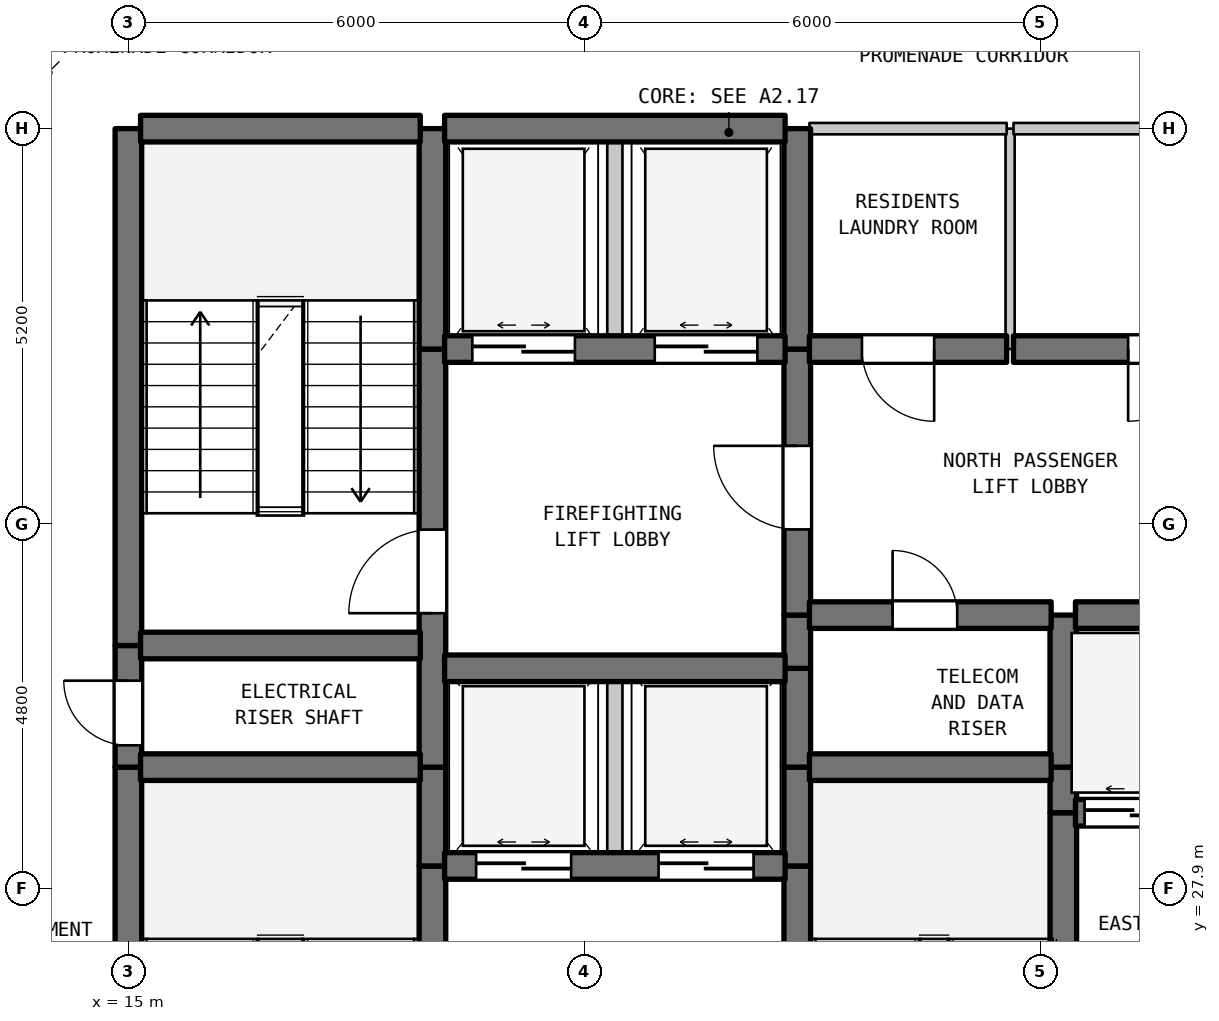
"""IFC4 building model, lengths in metres.
Left out: names, types, materials, properties, quantities, classifications, styles, units other than length and angle.
Written with IfcOpenShell. Run it as: python <this file> out.ifc"""

import sys

from ifc_helpers import new_model, si_unit, direction, frame, frame_2d, origin, place, context, subcontext, project, spatial, rectangle, extrude, element, fill, save


model = new_model("IFC4")
c1 = context("Model", 3, precision=1e-05, world=origin(), true_north=direction((0.0, 1.0)))
c2 = subcontext(c1, "Body", "Model", "MODEL_VIEW")
j1 = project(units=[si_unit("LENGTHUNIT", "METRE"), si_unit("PLANEANGLEUNIT", "RADIAN")], contexts=[c1])
p1 = place(None, origin())
s1 = spatial("IfcSite", under=j1, at=p1, CompositionType="ELEMENT")
p2 = place(p1, origin())
s2 = spatial("IfcBuilding", under=s1, at=p2, CompositionType="ELEMENT")
p3 = place(p2, frame((0.0, 0.0, 192.1)))
s3 = spatial("IfcBuildingStorey", under=s2, at=p3, CompositionType="ELEMENT", Elevation=192.1)
p4 = place(p3, frame((15.0, 22.7, 0.0), z_axis=(0.0, 0.0, 1.0), x_axis=(0.0, 1.0, 0.0)))
e1 = element("IfcWall", 1, at=p4, inside=s3, PredefinedType="SHEAR", context=c2, shape_type="SweptSolid", body=[
    extrude(rectangle(XDim=6.8, YDim=0.35, at=frame_2d((3.4, 0.0))), origin(), (0.0, 0.0, 1.0), 3.39),
])
p5 = place(p3, frame((15.0, 29.5, 0.0), z_axis=(0.0, 0.0, 1.0), x_axis=(0.0, 1.0, 0.0)))
e2 = element("IfcWall", 2, at=p5, inside=s3, PredefinedType="SHEAR", context=c2, shape_type="SweptSolid", body=[
    extrude(rectangle(XDim=1.6, YDim=0.35, at=frame_2d((0.8, 0.0))), origin(), (0.0, 0.0, 1.0), 3.39),
])
p6 = place(p5, frame((0.287, 0.0, 0.0)))
e3 = element("IfcOpeningElement", 3, at=p6, cuts=e2, PredefinedType="OPENING", context=c2, shape_type="SweptSolid", body=[
    extrude(rectangle(XDim=0.85, YDim=2.1, at=frame_2d((0.425, 1.05))), frame((0.0, 0.185, 0.0), z_axis=(0.0, -1.0, 0.0), x_axis=(1.0, 0.0, 0.0)), (0.0, 0.0, 1.0), 0.37),
])
p7 = place(p3, frame((15.0, 31.1, 0.0), z_axis=(0.0, 0.0, 1.0), x_axis=(0.0, 1.0, 0.0)))
e4 = element("IfcWall", 4, at=p7, inside=s3, PredefinedType="SHEAR", context=c2, shape_type="SweptSolid", body=[
    extrude(rectangle(XDim=6.8, YDim=0.35, at=frame_2d((3.4, 0.0))), origin(), (0.0, 0.0, 1.0), 3.39),
])
p8 = place(p3, frame((19.0, 22.7, 0.0), z_axis=(0.0, 0.0, 1.0), x_axis=(0.0, 1.0, 0.0)))
e5 = element("IfcWall", 5, at=p8, inside=s3, PredefinedType="SHEAR", context=c2, shape_type="SweptSolid", body=[
    extrude(rectangle(XDim=5.5, YDim=0.35, at=frame_2d((2.75, 0.0))), origin(), (0.0, 0.0, 1.0), 3.39),
])
p9 = place(p8, frame((0.631, 0.0, 0.0)))
e6 = element("IfcOpeningElement", 6, at=p9, cuts=e5, PredefinedType="OPENING", context=c2, shape_type="SweptSolid", body=[
    extrude(rectangle(XDim=1.1, YDim=2.15, at=frame_2d((0.55, 1.075))), frame((0.0, 0.185, 0.0), z_axis=(0.0, -1.0, 0.0), x_axis=(1.0, 0.0, 0.0)), (0.0, 0.0, 1.0), 0.37),
])
p10 = place(p3, frame((19.0, 28.2, 0.0), z_axis=(0.0, 0.0, 1.0), x_axis=(0.0, 1.0, 0.0)))
e7 = element("IfcWall", 7, at=p10, inside=s3, PredefinedType="SHEAR", context=c2, shape_type="SweptSolid", body=[
    extrude(rectangle(XDim=1.3, YDim=0.35, at=frame_2d((0.65, 0.0))), origin(), (0.0, 0.0, 1.0), 3.39),
])
p11 = place(p3, frame((19.0, 29.5, 0.0), z_axis=(0.0, 0.0, 1.0), x_axis=(0.0, 1.0, 0.0)))
e8 = element("IfcWall", 8, at=p11, inside=s3, PredefinedType="SHEAR", context=c2, shape_type="SweptSolid", body=[
    extrude(rectangle(XDim=5.5, YDim=0.35, at=frame_2d((2.75, 0.0))), origin(), (0.0, 0.0, 1.0), 3.39),
])
p12 = place(p11, frame((2.025, 0.0, 0.0)))
e9 = element("IfcOpeningElement", 9, at=p12, cuts=e8, PredefinedType="OPENING", context=c2, shape_type="SweptSolid", body=[
    extrude(rectangle(XDim=1.1, YDim=2.15, at=frame_2d((0.55, 1.075))), frame((0.0, 0.185, 0.0), z_axis=(0.0, -1.0, 0.0), x_axis=(1.0, 0.0, 0.0)), (0.0, 0.0, 1.0), 0.37),
])
p13 = place(p3, frame((19.0, 35.0, 0.0), z_axis=(0.0, 0.0, 1.0), x_axis=(0.0, 1.0, 0.0)))
e10 = element("IfcWall", 10, at=p13, inside=s3, PredefinedType="SHEAR", context=c2, shape_type="SweptSolid", body=[
    extrude(rectangle(XDim=2.9, YDim=0.35, at=frame_2d((1.45, 0.0))), origin(), (0.0, 0.0, 1.0), 3.39),
])
p14 = place(p3, frame((21.4, 28.2, 0.0), z_axis=(0.0, 0.0, 1.0), x_axis=(0.0, 1.0, 0.0)))
e11 = element("IfcWall", 11, at=p14, inside=s3, PredefinedType="STANDARD", context=c2, shape_type="SweptSolid", body=[
    extrude(rectangle(XDim=2.6, YDim=0.2, at=frame_2d((1.3, 0.0))), origin(), (0.0, 0.0, 1.0), 3.39),
])
p15 = place(p3, frame((21.4, 35.0, 0.0), z_axis=(0.0, 0.0, 1.0), x_axis=(0.0, 1.0, 0.0)))
e12 = element("IfcWall", 12, at=p15, inside=s3, PredefinedType="STANDARD", context=c2, shape_type="SweptSolid", body=[
    extrude(rectangle(XDim=2.9, YDim=0.2, at=frame_2d((1.45, 0.0))), origin(), (0.0, 0.0, 1.0), 3.39),
])
p16 = place(p3, frame((23.8, 22.7, 0.0), z_axis=(0.0, 0.0, 1.0), x_axis=(0.0, 1.0, 0.0)))
e13 = element("IfcWall", 13, at=p16, inside=s3, PredefinedType="SHEAR", context=c2, shape_type="SweptSolid", body=[
    extrude(rectangle(XDim=5.5, YDim=0.35, at=frame_2d((2.75, 0.0))), origin(), (0.0, 0.0, 1.0), 3.39),
])
p17 = place(p16, frame((0.235, 0.0, 0.0)))
e14 = element("IfcOpeningElement", 14, at=p17, cuts=e13, PredefinedType="OPENING", context=c2, shape_type="SweptSolid", body=[
    extrude(rectangle(XDim=1.1, YDim=2.15, at=frame_2d((0.55, 1.075))), frame((0.0, 0.185, 0.0), z_axis=(0.0, -1.0, 0.0), x_axis=(1.0, 0.0, 0.0)), (0.0, 0.0, 1.0), 0.37),
])
for number, where, z_axis, x_axis in (
    (15, (23.8, 28.2, 0.0), (0.0, 0.0, 1.0), (0.0, 1.0, 0.0)),
    (16, (23.8, 29.5, 0.0), (0.0, 0.0, 1.0), (0.0, 1.0, 0.0)),
):
    element("IfcWall", number, at=place(p3, frame(where, z_axis=z_axis, x_axis=x_axis)), inside=s3, PredefinedType="SHEAR", context=c2, shape_type="SweptSolid", body=[
        extrude(rectangle(XDim=1.3, YDim=0.35, at=frame_2d((0.65, 0.0))), origin(), (0.0, 0.0, 1.0), 3.39),
    ])
p18 = place(p3, frame((23.8, 30.8, 0.0), z_axis=(0.0, 0.0, 1.0), x_axis=(0.0, 1.0, 0.0)))
e17 = element("IfcWall", 17, at=p18, inside=s3, PredefinedType="SHEAR", context=c2, shape_type="SweptSolid", body=[
    extrude(rectangle(XDim=0.7, YDim=0.35, at=frame_2d((0.35, 0.0))), origin(), (0.0, 0.0, 1.0), 3.39),
])
p19 = place(p3, frame((23.8, 31.5, 0.0), z_axis=(0.0, 0.0, 1.0), x_axis=(0.0, 1.0, 0.0)))
e18 = element("IfcWall", 18, at=p19, inside=s3, PredefinedType="SHEAR", context=c2, shape_type="SweptSolid", body=[
    extrude(rectangle(XDim=3.5, YDim=0.35, at=frame_2d((1.75, 0.0))), origin(), (0.0, 0.0, 1.0), 3.39),
])
p20 = place(p19, frame((1.127, 0.0, 0.0)))
e19 = element("IfcOpeningElement", 19, at=p20, cuts=e18, PredefinedType="OPENING", context=c2, shape_type="SweptSolid", body=[
    extrude(rectangle(XDim=1.1, YDim=2.15, at=frame_2d((0.55, 1.075))), frame((0.0, 0.185, 0.0), z_axis=(0.0, -1.0, 0.0), x_axis=(1.0, 0.0, 0.0)), (0.0, 0.0, 1.0), 0.37),
])
p21 = place(p3, frame((23.8, 35.0, 0.0), z_axis=(0.0, 0.0, 1.0), x_axis=(0.0, 1.0, 0.0)))
e20 = element("IfcWall", 20, at=p21, inside=s3, PredefinedType="SHEAR", context=c2, shape_type="SweptSolid", body=[
    extrude(rectangle(XDim=2.9, YDim=0.35, at=frame_2d((1.45, 0.0))), origin(), (0.0, 0.0, 1.0), 3.39),
])
p22 = place(p3, frame((26.6, 35.0, 0.0), z_axis=(0.0, 0.0, 1.0), x_axis=(0.0, 1.0, 0.0)))
e21 = element("IfcWall", 21, at=p22, inside=s3, PredefinedType="PARTITIONING", context=c2, shape_type="SweptSolid", body=[
    extrude(rectangle(XDim=2.9, YDim=0.12, at=frame_2d((1.45, 0.0))), origin(), (0.0, 0.0, 1.0), 3.39),
])
p23 = place(p3, frame((27.3, 25.6, 0.0), z_axis=(0.0, 0.0, 1.0), x_axis=(0.0, 1.0, 0.0)))
e22 = element("IfcWall", 22, at=p23, inside=s3, PredefinedType="SHEAR", context=c2, shape_type="SweptSolid", body=[
    extrude(rectangle(XDim=3.3, YDim=0.35, at=frame_2d((1.65, 0.0))), origin(), (0.0, 0.0, 1.0), 3.39),
])
p24 = place(p3, frame((27.3, 28.9, 0.0), z_axis=(0.0, 0.0, 1.0), x_axis=(0.0, 1.0, 0.0)))
e23 = element("IfcWall", 23, at=p24, inside=s3, PredefinedType="SHEAR", context=c2, shape_type="SweptSolid", body=[
    extrude(rectangle(XDim=0.6, YDim=0.35, at=frame_2d((0.3, 0.0))), origin(), (0.0, 0.0, 1.0), 3.39),
])
p25 = place(p3, frame((27.3, 29.5, 0.0), z_axis=(0.0, 0.0, 1.0), x_axis=(0.0, 1.0, 0.0)))
e24 = element("IfcWall", 24, at=p25, inside=s3, PredefinedType="SHEAR", context=c2, shape_type="SweptSolid", body=[
    extrude(rectangle(XDim=2.0, YDim=0.35, at=frame_2d((1.0, 0.0))), origin(), (0.0, 0.0, 1.0), 3.39),
])
p26 = place(p3, frame((19.16, 28.2, 0.0), z_axis=(0.0, 0.0, 1.0), x_axis=(1.0, 0.0, 0.0)))
e25 = element("IfcWall", 25, at=p26, inside=s3, PredefinedType="SHEAR", context=c2, shape_type="SweptSolid", body=[
    extrude(rectangle(XDim=4.48, YDim=0.35, at=frame_2d((2.24, 0.0))), origin(), (0.0, 0.0, 1.0), 3.39),
])
p27 = place(p26, frame((0.415, 0.0, 0.0)))
e26 = element("IfcOpeningElement", 26, at=p27, cuts=e25, PredefinedType="OPENING", context=c2, shape_type="SweptSolid", body=[
    extrude(rectangle(XDim=1.25, YDim=2.2, at=frame_2d((0.625, 1.1))), frame((0.0, 0.185, 0.0), z_axis=(0.0, -1.0, 0.0), x_axis=(1.0, 0.0, 0.0)), (0.0, 0.0, 1.0), 0.37),
])
p28 = place(p26, frame((2.815, 0.0, 0.0)))
e27 = element("IfcOpeningElement", 27, at=p28, cuts=e25, PredefinedType="OPENING", context=c2, shape_type="SweptSolid", body=[
    extrude(rectangle(XDim=1.25, YDim=2.2, at=frame_2d((0.625, 1.1))), frame((0.0, 0.185, 0.0), z_axis=(0.0, -1.0, 0.0), x_axis=(1.0, 0.0, 0.0)), (0.0, 0.0, 1.0), 0.37),
])
p29 = place(p3, frame((27.46, 28.9, 0.0), z_axis=(0.0, 0.0, 1.0), x_axis=(1.0, 0.0, 0.0)))
e28 = element("IfcWall", 28, at=p29, inside=s3, PredefinedType="SHEAR", context=c2, shape_type="SweptSolid", body=[
    extrude(rectangle(XDim=3.18, YDim=0.35, at=frame_2d((1.59, 0.0))), origin(), (0.0, 0.0, 1.0), 3.39),
])
p30 = place(p29, frame((0.12, 0.0, 0.0)))
e29 = element("IfcOpeningElement", 29, at=p30, cuts=e28, PredefinedType="OPENING", context=c2, shape_type="SweptSolid", body=[
    extrude(rectangle(XDim=1.25, YDim=2.2, at=frame_2d((0.625, 1.1))), frame((0.0, 0.185, 0.0), z_axis=(0.0, -1.0, 0.0), x_axis=(1.0, 0.0, 0.0)), (0.0, 0.0, 1.0), 0.37),
])
p31 = place(p29, frame((1.81, 0.0, 0.0)))
e30 = element("IfcOpeningElement", 30, at=p31, cuts=e28, PredefinedType="OPENING", context=c2, shape_type="SweptSolid", body=[
    extrude(rectangle(XDim=1.25, YDim=2.2, at=frame_2d((0.625, 1.1))), frame((0.0, 0.185, 0.0), z_axis=(0.0, -1.0, 0.0), x_axis=(1.0, 0.0, 0.0)), (0.0, 0.0, 1.0), 0.37),
])
p32 = place(p3, frame((15.16, 29.5, 0.0), z_axis=(0.0, 0.0, 1.0), x_axis=(1.0, 0.0, 0.0)))
e31 = element("IfcWall", 31, at=p32, inside=s3, PredefinedType="SHEAR", context=c2, shape_type="SweptSolid", body=[
    extrude(rectangle(XDim=3.68, YDim=0.35, at=frame_2d((1.84, 0.0))), origin(), (0.0, 0.0, 1.0), 3.39),
])
p33 = place(p3, frame((23.96, 29.5, 0.0), z_axis=(0.0, 0.0, 1.0), x_axis=(1.0, 0.0, 0.0)))
e32 = element("IfcWall", 32, at=p33, inside=s3, PredefinedType="SHEAR", context=c2, shape_type="SweptSolid", body=[
    extrude(rectangle(XDim=3.18, YDim=0.35, at=frame_2d((1.59, 0.0))), origin(), (0.0, 0.0, 1.0), 3.39),
])
p34 = place(p3, frame((19.16, 30.8, 0.0), z_axis=(0.0, 0.0, 1.0), x_axis=(1.0, 0.0, 0.0)))
e33 = element("IfcWall", 33, at=p34, inside=s3, PredefinedType="SHEAR", context=c2, shape_type="SweptSolid", body=[
    extrude(rectangle(XDim=4.48, YDim=0.35, at=frame_2d((2.24, 0.0))), origin(), (0.0, 0.0, 1.0), 3.39),
])
p35 = place(p3, frame((15.16, 31.1, 0.0), z_axis=(0.0, 0.0, 1.0), x_axis=(1.0, 0.0, 0.0)))
e34 = element("IfcWall", 34, at=p35, inside=s3, PredefinedType="SHEAR", context=c2, shape_type="SweptSolid", body=[
    extrude(rectangle(XDim=3.68, YDim=0.35, at=frame_2d((1.84, 0.0))), origin(), (0.0, 0.0, 1.0), 3.39),
])
p36 = place(p3, frame((23.96, 31.5, 0.0), z_axis=(0.0, 0.0, 1.0), x_axis=(1.0, 0.0, 0.0)))
e35 = element("IfcWall", 35, at=p36, inside=s3, PredefinedType="SHEAR", context=c2, shape_type="SweptSolid", body=[
    extrude(rectangle(XDim=3.18, YDim=0.35, at=frame_2d((1.59, 0.0))), origin(), (0.0, 0.0, 1.0), 3.39),
])
p37 = place(p36, frame((1.094, 0.0, 0.0)))
e36 = element("IfcOpeningElement", 36, at=p37, cuts=e35, PredefinedType="OPENING", context=c2, shape_type="SweptSolid", body=[
    extrude(rectangle(XDim=0.85, YDim=2.1, at=frame_2d((0.425, 1.05))), frame((0.0, 0.185, 0.0), z_axis=(0.0, -1.0, 0.0), x_axis=(1.0, 0.0, 0.0)), (0.0, 0.0, 1.0), 0.37),
])
p38 = place(p3, frame((27.46, 31.5, 0.0), z_axis=(0.0, 0.0, 1.0), x_axis=(1.0, 0.0, 0.0)))
e37 = element("IfcWall", 37, at=p38, inside=s3, PredefinedType="SHEAR", context=c2, shape_type="SweptSolid", body=[
    extrude(rectangle(XDim=3.18, YDim=0.35, at=frame_2d((1.59, 0.0))), origin(), (0.0, 0.0, 1.0), 3.39),
])
p39 = place(p3, frame((19.16, 35.0, 0.0), z_axis=(0.0, 0.0, 1.0), x_axis=(1.0, 0.0, 0.0)))
e38 = element("IfcWall", 38, at=p39, inside=s3, PredefinedType="SHEAR", context=c2, shape_type="SweptSolid", body=[
    extrude(rectangle(XDim=4.48, YDim=0.35, at=frame_2d((2.24, 0.0))), origin(), (0.0, 0.0, 1.0), 3.39),
])
p40 = place(p39, frame((0.365, 0.0, 0.0)))
e39 = element("IfcOpeningElement", 39, at=p40, cuts=e38, PredefinedType="OPENING", context=c2, shape_type="SweptSolid", body=[
    extrude(rectangle(XDim=1.35, YDim=2.2, at=frame_2d((0.675, 1.1))), frame((0.0, 0.185, 0.0), z_axis=(0.0, -1.0, 0.0), x_axis=(1.0, 0.0, 0.0)), (0.0, 0.0, 1.0), 0.37),
])
p41 = place(p39, frame((2.765, 0.0, 0.0)))
e40 = element("IfcOpeningElement", 40, at=p41, cuts=e38, PredefinedType="OPENING", context=c2, shape_type="SweptSolid", body=[
    extrude(rectangle(XDim=1.35, YDim=2.2, at=frame_2d((0.675, 1.1))), frame((0.0, 0.185, 0.0), z_axis=(0.0, -1.0, 0.0), x_axis=(1.0, 0.0, 0.0)), (0.0, 0.0, 1.0), 0.37),
])
p42 = place(p3, frame((23.96, 35.0, 0.0), z_axis=(0.0, 0.0, 1.0), x_axis=(1.0, 0.0, 0.0)))
e41 = element("IfcWall", 41, at=p42, inside=s3, PredefinedType="SHEAR", context=c2, shape_type="SweptSolid", body=[
    extrude(rectangle(XDim=2.595, YDim=0.35, at=frame_2d((1.297, 0.0))), origin(), (0.0, 0.0, 1.0), 3.39),
])
p43 = place(p42, frame((0.691, 0.0, 0.0)))
e42 = element("IfcOpeningElement", 42, at=p43, cuts=e41, PredefinedType="OPENING", context=c2, shape_type="SweptSolid", body=[
    extrude(rectangle(XDim=0.95, YDim=2.15, at=frame_2d((0.475, 1.075))), frame((0.0, 0.185, 0.0), z_axis=(0.0, -1.0, 0.0), x_axis=(1.0, 0.0, 0.0)), (0.0, 0.0, 1.0), 0.37),
])
p44 = place(p3, frame((26.645, 35.0, 0.0), z_axis=(0.0, 0.0, 1.0), x_axis=(1.0, 0.0, 0.0)))
e43 = element("IfcWall", 43, at=p44, inside=s3, PredefinedType="SHEAR", context=c2, shape_type="SweptSolid", body=[
    extrude(rectangle(XDim=3.995, YDim=0.35, at=frame_2d((1.998, 0.0))), origin(), (0.0, 0.0, 1.0), 3.39),
])
p45 = place(p44, frame((1.508, 0.0, 0.0)))
e44 = element("IfcOpeningElement", 44, at=p45, cuts=e43, PredefinedType="OPENING", context=c2, shape_type="SweptSolid", body=[
    extrude(rectangle(XDim=0.95, YDim=2.15, at=frame_2d((0.475, 1.075))), frame((0.0, 0.185, 0.0), z_axis=(0.0, -1.0, 0.0), x_axis=(1.0, 0.0, 0.0)), (0.0, 0.0, 1.0), 0.37),
])
p46 = place(p3, frame((15.16, 37.9, 0.0), z_axis=(0.0, 0.0, 1.0), x_axis=(1.0, 0.0, 0.0)))
e45 = element("IfcWall", 45, at=p46, inside=s3, PredefinedType="SHEAR", context=c2, shape_type="SweptSolid", body=[
    extrude(rectangle(XDim=3.68, YDim=0.35, at=frame_2d((1.84, 0.0))), origin(), (0.0, 0.0, 1.0), 3.39),
])
p47 = place(p3, frame((19.16, 37.9, 0.0), z_axis=(0.0, 0.0, 1.0), x_axis=(1.0, 0.0, 0.0)))
e46 = element("IfcWall", 46, at=p47, inside=s3, PredefinedType="SHEAR", context=c2, shape_type="SweptSolid", body=[
    extrude(rectangle(XDim=4.48, YDim=0.35, at=frame_2d((2.24, 0.0))), origin(), (0.0, 0.0, 1.0), 3.39),
])
p48 = place(p3, frame((23.96, 37.9, 0.0), z_axis=(0.0, 0.0, 1.0), x_axis=(1.0, 0.0, 0.0)))
e47 = element("IfcWall", 47, at=p48, inside=s3, PredefinedType="STANDARD", context=c2, shape_type="SweptSolid", body=[
    extrude(rectangle(XDim=2.595, YDim=0.15, at=frame_2d((1.297, 0.0))), origin(), (0.0, 0.0, 1.0), 2.89),
])
p49 = place(p3, frame((26.645, 37.9, 0.0), z_axis=(0.0, 0.0, 1.0), x_axis=(1.0, 0.0, 0.0)))
e48 = element("IfcWall", 48, at=p49, inside=s3, PredefinedType="STANDARD", context=c2, shape_type="SweptSolid", body=[
    extrude(rectangle(XDim=4.095, YDim=0.15, at=frame_2d((2.047, 0.0))), origin(), (0.0, 0.0, 1.0), 2.89),
])
p50 = place(p6, origin())
e49 = element("IfcDoor", 49, at=p50, inside=s3, OperationType="SINGLE_SWING_RIGHT", PredefinedType="DOOR", context=c2, shape_type="SweptSolid", body=[
    extrude(rectangle(XDim=0.85, YDim=2.1, at=frame_2d((0.425, 1.05))), frame((0.0, 0.025, 0.0), z_axis=(0.0, -1.0, 0.0), x_axis=(1.0, 0.0, 0.0)), (0.0, 0.0, 1.0), 0.05),
])
fill(e3, e49)
p51 = place(p12, origin())
e50 = element("IfcDoor", 50, at=p51, inside=s3, OperationType="SINGLE_SWING_LEFT", PredefinedType="DOOR", context=c2, shape_type="SweptSolid", body=[
    extrude(rectangle(XDim=1.1, YDim=2.15, at=frame_2d((0.55, 1.075))), frame((0.0, 0.025, 0.0), z_axis=(0.0, -1.0, 0.0), x_axis=(1.0, 0.0, 0.0)), (0.0, 0.0, 1.0), 0.05),
])
fill(e9, e50)
p52 = place(p20, origin())
e51 = element("IfcDoor", 51, at=p52, inside=s3, OperationType="SINGLE_SWING_RIGHT", PredefinedType="DOOR", context=c2, shape_type="SweptSolid", body=[
    extrude(rectangle(XDim=1.1, YDim=2.15, at=frame_2d((0.55, 1.075))), frame((0.0, 0.025, 0.0), z_axis=(0.0, -1.0, 0.0), x_axis=(1.0, 0.0, 0.0)), (0.0, 0.0, 1.0), 0.05),
])
fill(e19, e51)
p53 = place(p27, origin())
e52 = element("IfcDoor", 52, at=p53, inside=s3, OperationType="DOUBLE_DOOR_SLIDING", PredefinedType="DOOR", context=c2, shape_type="SweptSolid", body=[
    extrude(rectangle(XDim=1.25, YDim=2.2, at=frame_2d((0.625, 1.1))), frame((0.0, 0.025, 0.0), z_axis=(0.0, -1.0, 0.0), x_axis=(1.0, 0.0, 0.0)), (0.0, 0.0, 1.0), 0.05),
])
fill(e26, e52)
p54 = place(p28, origin())
e53 = element("IfcDoor", 53, at=p54, inside=s3, OperationType="DOUBLE_DOOR_SLIDING", PredefinedType="DOOR", context=c2, shape_type="SweptSolid", body=[
    extrude(rectangle(XDim=1.25, YDim=2.2, at=frame_2d((0.625, 1.1))), frame((0.0, 0.025, 0.0), z_axis=(0.0, -1.0, 0.0), x_axis=(1.0, 0.0, 0.0)), (0.0, 0.0, 1.0), 0.05),
])
fill(e27, e53)
p55 = place(p30, origin())
e54 = element("IfcDoor", 54, at=p55, inside=s3, OperationType="DOUBLE_DOOR_SLIDING", PredefinedType="DOOR", context=c2, shape_type="SweptSolid", body=[
    extrude(rectangle(XDim=1.25, YDim=2.2, at=frame_2d((0.625, 1.1))), frame((0.0, 0.025, 0.0), z_axis=(0.0, -1.0, 0.0), x_axis=(1.0, 0.0, 0.0)), (0.0, 0.0, 1.0), 0.05),
])
fill(e29, e54)
p56 = place(p37, origin())
e55 = element("IfcDoor", 55, at=p56, inside=s3, OperationType="SINGLE_SWING_LEFT", PredefinedType="DOOR", context=c2, shape_type="SweptSolid", body=[
    extrude(rectangle(XDim=0.85, YDim=2.1, at=frame_2d((0.425, 1.05))), frame((0.0, 0.025, 0.0), z_axis=(0.0, -1.0, 0.0), x_axis=(1.0, 0.0, 0.0)), (0.0, 0.0, 1.0), 0.05),
])
fill(e36, e55)
p57 = place(p40, origin())
e56 = element("IfcDoor", 56, at=p57, inside=s3, OperationType="DOUBLE_DOOR_SLIDING", PredefinedType="DOOR", context=c2, shape_type="SweptSolid", body=[
    extrude(rectangle(XDim=1.35, YDim=2.2, at=frame_2d((0.675, 1.1))), frame((0.0, 0.025, 0.0), z_axis=(0.0, -1.0, 0.0), x_axis=(1.0, 0.0, 0.0)), (0.0, 0.0, 1.0), 0.05),
])
fill(e39, e56)
p58 = place(p41, origin())
e57 = element("IfcDoor", 57, at=p58, inside=s3, OperationType="DOUBLE_DOOR_SLIDING", PredefinedType="DOOR", context=c2, shape_type="SweptSolid", body=[
    extrude(rectangle(XDim=1.35, YDim=2.2, at=frame_2d((0.675, 1.1))), frame((0.0, 0.025, 0.0), z_axis=(0.0, -1.0, 0.0), x_axis=(1.0, 0.0, 0.0)), (0.0, 0.0, 1.0), 0.05),
])
fill(e40, e57)
p59 = place(p43, frame((0.95, 0.0, 0.0), z_axis=(0.0, 0.0, 1.0), x_axis=(-1.0, 0.0, 0.0)))
e58 = element("IfcDoor", 58, at=p59, inside=s3, OperationType="SINGLE_SWING_RIGHT", PredefinedType="DOOR", context=c2, shape_type="SweptSolid", body=[
    extrude(rectangle(XDim=0.95, YDim=2.15, at=frame_2d((0.475, 1.075))), frame((0.0, 0.025, 0.0), z_axis=(0.0, -1.0, 0.0), x_axis=(1.0, 0.0, 0.0)), (0.0, 0.0, 1.0), 0.05),
])
fill(e42, e58)
p60 = place(p45, frame((0.95, 0.0, 0.0), z_axis=(0.0, 0.0, 1.0), x_axis=(-1.0, 0.0, 0.0)))
e59 = element("IfcDoor", 59, at=p60, inside=s3, OperationType="SINGLE_SWING_LEFT", PredefinedType="DOOR", context=c2, shape_type="SweptSolid", body=[
    extrude(rectangle(XDim=0.95, YDim=2.15, at=frame_2d((0.475, 1.075))), frame((0.0, 0.025, 0.0), z_axis=(0.0, -1.0, 0.0), x_axis=(1.0, 0.0, 0.0)), (0.0, 0.0, 1.0), 0.05),
])
fill(e44, e59)
save(model, sys.argv[1])
